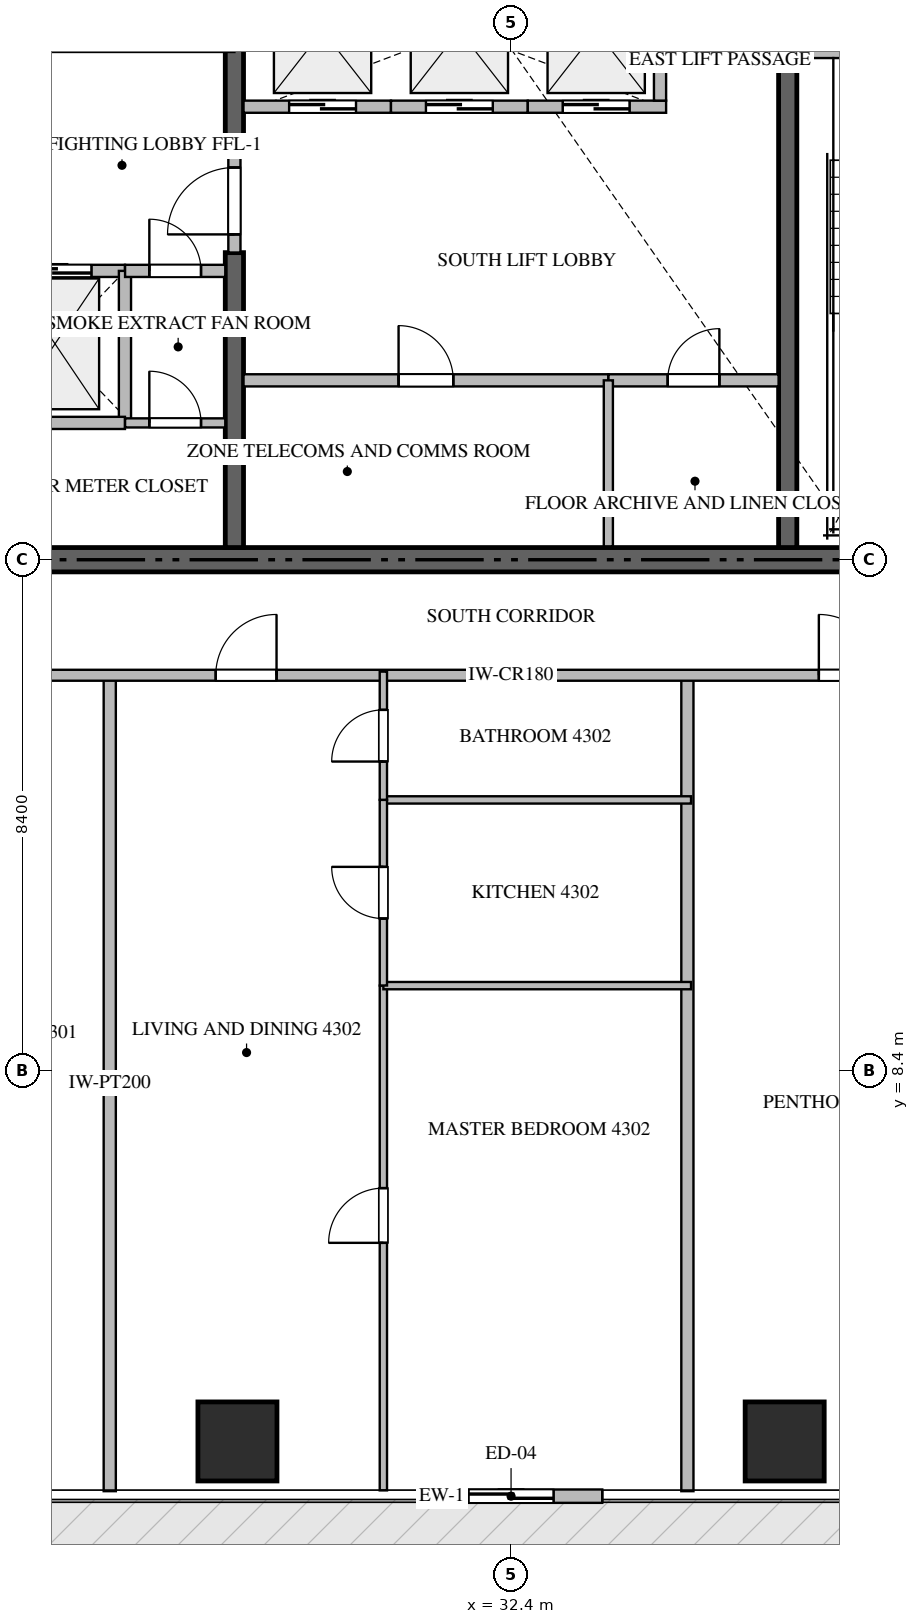
"""IFC4 building model, lengths in metres.
Left out: names, types, materials, properties, quantities, classifications, styles, units other than length and angle.
Written with IfcOpenShell. Run it as: python <this file> out.ifc"""

import sys

from ifc_helpers import new_model, si_unit, direction, frame, frame_2d, origin, origin_2d, place, context, subcontext, project, spatial, rectangle, extrude, source, transform, mapped, element, fill, save


model = new_model("IFC4")
c1 = context("Model", 3, precision=1e-05, world=origin(), true_north=direction((0.0, 1.0)))
c2 = subcontext(c1, "Body", "Model", "MODEL_VIEW")
j1 = project(units=[si_unit("LENGTHUNIT", "METRE"), si_unit("PLANEANGLEUNIT", "RADIAN")], contexts=[c1])
p1 = place(None, origin())
s1 = spatial("IfcSite", under=j1, at=p1, CompositionType="ELEMENT")
p2 = place(p1, origin())
s2 = spatial("IfcBuilding", under=s1, at=p2, CompositionType="ELEMENT")
p3 = place(p2, frame((0.0, 0.0, 172.65)))
s3 = spatial("IfcBuildingStorey", under=s2, at=p3, CompositionType="ELEMENT", Elevation=172.65)
p4 = place(p3, frame((23.4, 16.8, -0.26), z_axis=(0.0, 0.0, 1.0), x_axis=(1.0, 0.0, 0.0)))
e1 = element("IfcWall", 1, at=p4, inside=s3, PredefinedType="SHEAR", context=c2, shape_type="SweptSolid", body=[
    extrude(rectangle(XDim=18.0, YDim=0.4, at=frame_2d((9.0, 0.0))), origin(), (0.0, 0.0, 1.0), 3.748),
])
p5 = place(p3, frame((27.85, 17.0, -0.26), z_axis=(0.0, 0.0, 1.0), x_axis=(0.0, 1.0, 0.0)))
e2 = element("IfcWall", 2, at=p5, inside=s3, PredefinedType="SHEAR", context=c2, shape_type="SweptSolid", body=[
    extrude(rectangle(XDim=4.85, YDim=0.3, at=frame_2d((2.425, 0.0))), origin(), (0.0, 0.0, 1.0), 3.748),
])
p6 = place(p3, frame((27.85, 23.55, -0.26), z_axis=(0.0, 0.0, 1.0), x_axis=(0.0, 1.0, 0.0)))
e3 = element("IfcWall", 3, at=p6, inside=s3, PredefinedType="SHEAR", context=c2, shape_type="SweptSolid", body=[
    extrude(rectangle(XDim=9.85, YDim=0.3, at=frame_2d((4.925, 0.0))), origin(), (0.0, 0.0, 1.0), 3.748),
])
p7 = place(p3, frame((36.95, 17.0, -0.26), z_axis=(0.0, 0.0, 1.0), x_axis=(0.0, 1.0, 0.0)))
e4 = element("IfcWall", 4, at=p7, inside=s3, PredefinedType="SHEAR", context=c2, shape_type="SweptSolid", body=[
    extrude(rectangle(XDim=8.35, YDim=0.3, at=frame_2d((4.175, 0.0))), origin(), (0.0, 0.0, 1.0), 3.748),
])
m1 = source(origin(), c2, "Body", "SweptSolid", [
    extrude(rectangle(XDim=1.3, YDim=1.3, at=origin_2d()), origin(), (0.0, 0.0, 1.0), 3.75),
])
for number, where, z_axis, x_axis in (
    (5, (27.9, 2.3, -0.26), (0.0, 0.0, 1.0), (1.0, 0.0, 0.0)),
    (6, (36.9, 2.3, -0.26), (0.0, 0.0, 1.0), (1.0, 0.0, 0.0)),
):
    element("IfcColumn", number, at=place(p3, frame(where, z_axis=z_axis, x_axis=x_axis)), inside=s3, PredefinedType="COLUMN", context=c2, shape_type="MappedRepresentation", body=[
        mapped(m1, transform((0.0, 0.0, 0.0), scale=1.0)),
    ])
p8 = place(p3, frame((30.9, 1.4, 0.0), z_axis=(0.0, 0.0, 1.0), x_axis=(1.0, 0.0, 0.0)))
e7 = element("IfcWall", 7, at=p8, inside=s3, PredefinedType="ELEMENTEDWALL", context=c2, shape_type="SweptSolid", body=[
    extrude(rectangle(XDim=3.0, YDim=0.22, at=frame_2d((1.5, 0.0))), origin(), (0.0, 0.0, 1.0), 3.475),
])
p9 = place(p8, frame((0.8, 0.0, 0.0)))
e8 = element("IfcOpeningElement", 8, at=p9, cuts=e7, PredefinedType="OPENING", context=c2, shape_type="SweptSolid", body=[
    extrude(rectangle(XDim=1.4, YDim=2.25, at=frame_2d((0.7, 1.125))), frame((0.0, 0.12, 0.0), z_axis=(0.0, -1.0, 0.0), x_axis=(1.0, 0.0, 0.0)), (0.0, 0.0, 1.0), 0.24),
])
p10 = place(p3, frame((36.95, 25.15, 0.0), z_axis=(0.0, 0.0, 1.0), x_axis=(1.0, 0.0, 0.0)))
e9 = element("IfcWall", 9, at=p10, inside=s3, PredefinedType="STANDARD", context=c2, shape_type="SweptSolid", body=[
    extrude(rectangle(XDim=4.45, YDim=0.2, at=frame_2d((2.225, 0.0))), origin(), (0.0, 0.0, 1.0), 3.49),
])
p11 = place(p10, frame((1.65, 0.0, 0.0)))
e10 = element("IfcOpeningElement", 10, at=p11, cuts=e9, PredefinedType="OPENING", context=c2, shape_type="SweptSolid", body=[
    extrude(rectangle(XDim=1.1, YDim=2.15, at=frame_2d((0.55, 1.075))), frame((0.0, 0.11, 0.0), z_axis=(0.0, -1.0, 0.0), x_axis=(1.0, 0.0, 0.0)), (0.0, 0.0, 1.0), 0.22),
])
p12 = place(p3, frame((23.6, 21.55, 0.0), z_axis=(0.0, 0.0, 1.0), x_axis=(1.0, 0.0, 0.0)))
e11 = element("IfcWall", 11, at=p12, inside=s3, PredefinedType="STANDARD", context=c2, shape_type="SweptSolid", body=[
    extrude(rectangle(XDim=2.45, YDim=0.2, at=frame_2d((1.225, 0.0))), origin(), (0.0, 0.0, 1.0), 3.49),
])
p13 = place(p12, frame((0.7, 0.0, 0.0)))
e12 = element("IfcOpeningElement", 12, at=p13, cuts=e11, PredefinedType="OPENING", context=c2, shape_type="SweptSolid", body=[
    extrude(rectangle(XDim=1.2, YDim=2.2, at=frame_2d((0.6, 1.1))), frame((0.0, 0.11, 0.0), z_axis=(0.0, -1.0, 0.0), x_axis=(1.0, 0.0, 0.0)), (0.0, 0.0, 1.0), 0.22),
])
p14 = place(p3, frame((28.0, 24.25, 0.0), z_axis=(0.0, 0.0, 1.0), x_axis=(1.0, 0.0, 0.0)))
e13 = element("IfcWall", 13, at=p14, inside=s3, PredefinedType="STANDARD", context=c2, shape_type="SweptSolid", body=[
    extrude(rectangle(XDim=2.425, YDim=0.2, at=frame_2d((1.212, 0.0))), origin(), (0.0, 0.0, 1.0), 3.49),
])
p15 = place(p14, frame((0.75, 0.0, 0.0)))
e14 = element("IfcOpeningElement", 14, at=p15, cuts=e13, PredefinedType="OPENING", context=c2, shape_type="SweptSolid", body=[
    extrude(rectangle(XDim=1.1, YDim=2.2, at=frame_2d((0.55, 1.1))), frame((0.0, 0.11, 0.0), z_axis=(0.0, -1.0, 0.0), x_axis=(1.0, 0.0, 0.0)), (0.0, 0.0, 1.0), 0.22),
])
p16 = place(p3, frame((30.425, 24.25, 0.0), z_axis=(0.0, 0.0, 1.0), x_axis=(1.0, 0.0, 0.0)))
e15 = element("IfcWall", 15, at=p16, inside=s3, PredefinedType="STANDARD", context=c2, shape_type="SweptSolid", body=[
    extrude(rectangle(XDim=2.25, YDim=0.2, at=frame_2d((1.125, 0.0))), origin(), (0.0, 0.0, 1.0), 3.49),
])
p17 = place(p16, frame((0.575, 0.0, 0.0)))
e16 = element("IfcOpeningElement", 16, at=p17, cuts=e15, PredefinedType="OPENING", context=c2, shape_type="SweptSolid", body=[
    extrude(rectangle(XDim=1.1, YDim=2.2, at=frame_2d((0.55, 1.1))), frame((0.0, 0.11, 0.0), z_axis=(0.0, -1.0, 0.0), x_axis=(1.0, 0.0, 0.0)), (0.0, 0.0, 1.0), 0.22),
])
p18 = place(p3, frame((32.675, 24.25, 0.0), z_axis=(0.0, 0.0, 1.0), x_axis=(1.0, 0.0, 0.0)))
e17 = element("IfcWall", 17, at=p18, inside=s3, PredefinedType="STANDARD", context=c2, shape_type="SweptSolid", body=[
    extrude(rectangle(XDim=2.275, YDim=0.2, at=frame_2d((1.137, 0.0))), origin(), (0.0, 0.0, 1.0), 3.49),
])
p19 = place(p18, frame((0.575, 0.0, 0.0)))
e18 = element("IfcOpeningElement", 18, at=p19, cuts=e17, PredefinedType="OPENING", context=c2, shape_type="SweptSolid", body=[
    extrude(rectangle(XDim=1.1, YDim=2.2, at=frame_2d((0.55, 1.1))), frame((0.0, 0.11, 0.0), z_axis=(0.0, -1.0, 0.0), x_axis=(1.0, 0.0, 0.0)), (0.0, 0.0, 1.0), 0.22),
])
for number, where, z_axis, x_axis in (
    (19, (34.85, 24.35, 0.0), (0.0, 0.0, 1.0), (0.0, 1.0, 0.0)),
    (20, (26.05, 19.05, 0.0), (0.0, 0.0, 1.0), (0.0, 1.0, 0.0)),
):
    element("IfcWall", number, at=place(p3, frame(where, z_axis=z_axis, x_axis=x_axis)), inside=s3, PredefinedType="STANDARD", context=c2, shape_type="SweptSolid", body=[
        extrude(rectangle(XDim=2.5, YDim=0.2, at=frame_2d((1.25, 0.0))), origin(), (0.0, 0.0, 1.0), 3.49),
    ])
p20 = place(p3, frame((23.6, 19.05, 0.0), z_axis=(0.0, 0.0, 1.0), x_axis=(1.0, 0.0, 0.0)))
e21 = element("IfcWall", 21, at=p20, inside=s3, PredefinedType="STANDARD", context=c2, shape_type="SweptSolid", body=[
    extrude(rectangle(XDim=2.45, YDim=0.2, at=frame_2d((1.225, 0.0))), origin(), (0.0, 0.0, 1.0), 3.49),
])
p21 = place(p3, frame((26.052, 21.55, 0.0), z_axis=(0.0, 0.0, 1.0), x_axis=(1.0, 0.0, 0.0)))
e22 = element("IfcWall", 22, at=p21, inside=s3, PredefinedType="STANDARD", context=c2, shape_type="SweptSolid", body=[
    extrude(rectangle(XDim=1.648, YDim=0.2, at=frame_2d((0.824, 0.0))), origin(), (0.0, 0.0, 1.0), 3.49),
])
p22 = place(p21, frame((0.399, 0.0, 0.0)))
e23 = element("IfcOpeningElement", 23, at=p22, cuts=e22, PredefinedType="OPENING", context=c2, shape_type="SweptSolid", body=[
    extrude(rectangle(XDim=0.85, YDim=2.1, at=frame_2d((0.425, 1.05))), frame((0.0, 0.11, 0.0), z_axis=(0.0, -1.0, 0.0), x_axis=(1.0, 0.0, 0.0)), (0.0, 0.0, 1.0), 0.22),
])
p23 = place(p3, frame((27.85, 21.852, 0.0), z_axis=(0.0, 0.0, 1.0), x_axis=(0.0, 1.0, 0.0)))
e24 = element("IfcWall", 24, at=p23, inside=s3, PredefinedType="STANDARD", context=c2, shape_type="SweptSolid", body=[
    extrude(rectangle(XDim=1.696, YDim=0.2, at=frame_2d((0.848, 0.0))), origin(), (0.0, 0.0, 1.0), 3.49),
])
p24 = place(p23, frame((0.298, 0.0, 0.0)))
e25 = element("IfcOpeningElement", 25, at=p24, cuts=e24, PredefinedType="OPENING", context=c2, shape_type="SweptSolid", body=[
    extrude(rectangle(XDim=1.1, YDim=2.15, at=frame_2d((0.55, 1.075))), frame((0.0, 0.11, 0.0), z_axis=(0.0, -1.0, 0.0), x_axis=(1.0, 0.0, 0.0)), (0.0, 0.0, 1.0), 0.22),
])
p25 = place(p3, frame((26.052, 19.05, 0.0), z_axis=(0.0, 0.0, 1.0), x_axis=(1.0, 0.0, 0.0)))
e26 = element("IfcWall", 26, at=p25, inside=s3, PredefinedType="PARTITIONING", context=c2, shape_type="SweptSolid", body=[
    extrude(rectangle(XDim=1.648, YDim=0.15, at=frame_2d((0.824, 0.0))), origin(), (0.0, 0.0, 1.0), 3.49),
])
p26 = place(p25, frame((0.399, 0.0, 0.0)))
e27 = element("IfcOpeningElement", 27, at=p26, cuts=e26, PredefinedType="OPENING", context=c2, shape_type="SweptSolid", body=[
    extrude(rectangle(XDim=0.85, YDim=2.1, at=frame_2d((0.425, 1.05))), frame((0.0, 0.085, 0.0), z_axis=(0.0, -1.0, 0.0), x_axis=(1.0, 0.0, 0.0)), (0.0, 0.0, 1.0), 0.17),
])
p27 = place(p3, frame((28.0, 19.75, 0.0), z_axis=(0.0, 0.0, 1.0), x_axis=(1.0, 0.0, 0.0)))
e28 = element("IfcWall", 28, at=p27, inside=s3, PredefinedType="STANDARD", context=c2, shape_type="SweptSolid", body=[
    extrude(rectangle(XDim=6.0, YDim=0.2, at=frame_2d((3.0, 0.0))), origin(), (0.0, 0.0, 1.0), 3.49),
])
p28 = place(p27, frame((2.55, 0.0, 0.0)))
e29 = element("IfcOpeningElement", 29, at=p28, cuts=e28, PredefinedType="OPENING", context=c2, shape_type="SweptSolid", body=[
    extrude(rectangle(XDim=0.9, YDim=2.1, at=frame_2d((0.45, 1.05))), frame((0.0, 0.11, 0.0), z_axis=(0.0, -1.0, 0.0), x_axis=(1.0, 0.0, 0.0)), (0.0, 0.0, 1.0), 0.22),
])
p29 = place(p3, frame((34.002, 19.75, 0.0), z_axis=(0.0, 0.0, 1.0), x_axis=(1.0, 0.0, 0.0)))
e30 = element("IfcWall", 30, at=p29, inside=s3, PredefinedType="STANDARD", context=c2, shape_type="SweptSolid", body=[
    extrude(rectangle(XDim=2.798, YDim=0.2, at=frame_2d((1.399, 0.0))), origin(), (0.0, 0.0, 1.0), 3.49),
])
p30 = place(p29, frame((0.974, 0.0, 0.0)))
e31 = element("IfcOpeningElement", 31, at=p30, cuts=e30, PredefinedType="OPENING", context=c2, shape_type="SweptSolid", body=[
    extrude(rectangle(XDim=0.85, YDim=2.1, at=frame_2d((0.425, 1.05))), frame((0.0, 0.11, 0.0), z_axis=(0.0, -1.0, 0.0), x_axis=(1.0, 0.0, 0.0)), (0.0, 0.0, 1.0), 0.22),
])
p31 = place(p3, frame((34.0, 17.02, 0.0), z_axis=(0.0, 0.0, 1.0), x_axis=(0.0, 1.0, 0.0)))
e32 = element("IfcWall", 32, at=p31, inside=s3, PredefinedType="PARTITIONING", context=c2, shape_type="SweptSolid", body=[
    extrude(rectangle(XDim=2.73, YDim=0.15, at=frame_2d((1.365, 0.0))), origin(), (0.0, 0.0, 1.0), 3.49),
])
for number, where, z_axis, x_axis in (
    (33, (25.8, 1.482, 0.0), (0.0, 0.0, 1.0), (0.0, 1.0, 0.0)),
    (34, (35.3, 1.482, 0.0), (0.0, 0.0, 1.0), (0.0, 1.0, 0.0)),
):
    element("IfcWall", number, at=place(p3, frame(where, z_axis=z_axis, x_axis=x_axis)), inside=s3, PredefinedType="PARTITIONING", context=c2, shape_type="SweptSolid", body=[
        extrude(rectangle(XDim=13.418, YDim=0.2, at=frame_2d((6.709, 0.0))), origin(), (0.0, 0.0, 1.0), 3.49),
    ])
p32 = place(p3, frame((20.952, 14.9, 0.0), z_axis=(0.0, 0.0, 1.0), x_axis=(1.0, 0.0, 0.0)))
e35 = element("IfcWall", 35, at=p32, inside=s3, PredefinedType="PARTITIONING", context=c2, shape_type="SweptSolid", body=[
    extrude(rectangle(XDim=22.896, YDim=0.18, at=frame_2d((11.448, 0.0))), origin(), (0.0, 0.0, 1.0), 3.49),
])
p33 = place(p32, frame((2.387, 0.0, 0.0)))
e36 = element("IfcOpeningElement", 36, at=p33, cuts=e35, PredefinedType="OPENING", context=c2, shape_type="SweptSolid", body=[
    extrude(rectangle(XDim=1.0, YDim=2.15, at=frame_2d((0.5, 1.075))), frame((0.0, 0.1, 0.0), z_axis=(0.0, -1.0, 0.0), x_axis=(1.0, 0.0, 0.0)), (0.0, 0.0, 1.0), 0.2),
])
p34 = place(p32, frame((6.591, 0.0, 0.0)))
e37 = element("IfcOpeningElement", 37, at=p34, cuts=e35, PredefinedType="OPENING", context=c2, shape_type="SweptSolid", body=[
    extrude(rectangle(XDim=1.0, YDim=2.15, at=frame_2d((0.5, 1.075))), frame((0.0, 0.1, 0.0), z_axis=(0.0, -1.0, 0.0), x_axis=(1.0, 0.0, 0.0)), (0.0, 0.0, 1.0), 0.2),
])
p35 = place(p32, frame((16.51, 0.0, 0.0)))
e38 = element("IfcOpeningElement", 38, at=p35, cuts=e35, PredefinedType="OPENING", context=c2, shape_type="SweptSolid", body=[
    extrude(rectangle(XDim=1.0, YDim=2.15, at=frame_2d((0.5, 1.075))), frame((0.0, 0.1, 0.0), z_axis=(0.0, -1.0, 0.0), x_axis=(1.0, 0.0, 0.0)), (0.0, 0.0, 1.0), 0.2),
])
p36 = place(p3, frame((30.3, 1.495, 0.0), z_axis=(0.0, 0.0, 1.0), x_axis=(0.0, 1.0, 0.0)))
e39 = element("IfcWall", 39, at=p36, inside=s3, PredefinedType="PARTITIONING", context=c2, shape_type="SweptSolid", body=[
    extrude(rectangle(XDim=8.301, YDim=0.12, at=frame_2d((4.15, 0.0))), origin(), (0.0, 0.0, 1.0), 3.49),
])
p37 = place(p36, frame((4.071, 0.0, 0.0)))
e40 = element("IfcOpeningElement", 40, at=p37, cuts=e39, PredefinedType="OPENING", context=c2, shape_type="SweptSolid", body=[
    extrude(rectangle(XDim=0.9, YDim=2.1, at=frame_2d((0.45, 1.05))), frame((0.0, 0.07, 0.0), z_axis=(0.0, -1.0, 0.0), x_axis=(1.0, 0.0, 0.0)), (0.0, 0.0, 1.0), 0.14),
])
for number, where, z_axis, x_axis in (
    (41, (30.3, 9.796, 0.0), (0.0, 0.0, 1.0), (1.0, 0.0, 0.0)),
    (42, (30.3, 12.85, 0.0), (0.0, 0.0, 1.0), (1.0, 0.0, 0.0)),
):
    element("IfcWall", number, at=place(p3, frame(where, z_axis=z_axis, x_axis=x_axis)), inside=s3, PredefinedType="PARTITIONING", context=c2, shape_type="SweptSolid", body=[
        extrude(rectangle(XDim=5.06, YDim=0.12, at=frame_2d((2.53, 0.0))), origin(), (0.0, 0.0, 1.0), 3.49),
    ])
p38 = place(p3, frame((30.3, 9.798, 0.0), z_axis=(0.0, 0.0, 1.0), x_axis=(0.0, 1.0, 0.0)))
e43 = element("IfcWall", 43, at=p38, inside=s3, PredefinedType="PARTITIONING", context=c2, shape_type="SweptSolid", body=[
    extrude(rectangle(XDim=3.052, YDim=0.12, at=frame_2d((1.526, 0.0))), origin(), (0.0, 0.0, 1.0), 3.49),
])
p39 = place(p38, frame((1.101, 0.0, 0.0)))
e44 = element("IfcOpeningElement", 44, at=p39, cuts=e43, PredefinedType="OPENING", context=c2, shape_type="SweptSolid", body=[
    extrude(rectangle(XDim=0.85, YDim=2.1, at=frame_2d((0.425, 1.05))), frame((0.0, 0.07, 0.0), z_axis=(0.0, -1.0, 0.0), x_axis=(1.0, 0.0, 0.0)), (0.0, 0.0, 1.0), 0.14),
])
p40 = place(p3, frame((30.3, 12.852, 0.0), z_axis=(0.0, 0.0, 1.0), x_axis=(0.0, 1.0, 0.0)))
e45 = element("IfcWall", 45, at=p40, inside=s3, PredefinedType="PARTITIONING", context=c2, shape_type="SweptSolid", body=[
    extrude(rectangle(XDim=2.108, YDim=0.12, at=frame_2d((1.054, 0.0))), origin(), (0.0, 0.0, 1.0), 3.49),
])
p41 = place(p40, frame((0.629, 0.0, 0.0)))
e46 = element("IfcOpeningElement", 46, at=p41, cuts=e45, PredefinedType="OPENING", context=c2, shape_type="SweptSolid", body=[
    extrude(rectangle(XDim=0.85, YDim=2.1, at=frame_2d((0.425, 1.05))), frame((0.0, 0.07, 0.0), z_axis=(0.0, -1.0, 0.0), x_axis=(1.0, 0.0, 0.0)), (0.0, 0.0, 1.0), 0.14),
])
m2 = source(origin(), c2, "Body", "SweptSolid", [
    extrude(rectangle(XDim=1.4, YDim=2.25, at=frame_2d((0.7, 1.125))), frame((0.0, 0.025, 0.0), z_axis=(0.0, -1.0, 0.0), x_axis=(1.0, 0.0, 0.0)), (0.0, 0.0, 1.0), 0.05),
])
p42 = place(p9, origin())
e47 = element("IfcDoor", 47, at=p42, inside=s3, OperationType="SLIDING_TO_LEFT", PredefinedType="DOOR", context=c2, shape_type="MappedRepresentation", body=[
    mapped(m2, transform((0.0, 0.0, 0.0), scale=1.0)),
])
fill(e8, e47)
m3 = source(origin(), c2, "Body", "SweptSolid", [
    extrude(rectangle(XDim=1.2, YDim=2.2, at=frame_2d((0.6, 1.1))), frame((0.0, 0.025, 0.0), z_axis=(0.0, -1.0, 0.0), x_axis=(1.0, 0.0, 0.0)), (0.0, 0.0, 1.0), 0.05),
])
p43 = place(p13, origin())
e48 = element("IfcDoor", 48, at=p43, inside=s3, OperationType="DOUBLE_DOOR_SLIDING", PredefinedType="DOOR", context=c2, shape_type="MappedRepresentation", body=[
    mapped(m3, transform((0.0, 0.0, 0.0), scale=1.0)),
])
fill(e12, e48)
m4 = source(origin(), c2, "Body", "SweptSolid", [
    extrude(rectangle(XDim=1.1, YDim=2.2, at=frame_2d((0.55, 1.1))), frame((0.0, 0.025, 0.0), z_axis=(0.0, -1.0, 0.0), x_axis=(1.0, 0.0, 0.0)), (0.0, 0.0, 1.0), 0.05),
])
p44 = place(p15, origin())
e49 = element("IfcDoor", 49, at=p44, inside=s3, OperationType="DOUBLE_DOOR_SLIDING", PredefinedType="DOOR", context=c2, shape_type="MappedRepresentation", body=[
    mapped(m4, transform((0.0, 0.0, 0.0), scale=1.0)),
])
fill(e14, e49)
p45 = place(p17, origin())
e50 = element("IfcDoor", 50, at=p45, inside=s3, OperationType="DOUBLE_DOOR_SLIDING", PredefinedType="DOOR", context=c2, shape_type="MappedRepresentation", body=[
    mapped(m4, transform((0.0, 0.0, 0.0), scale=1.0)),
])
fill(e16, e50)
p46 = place(p19, origin())
e51 = element("IfcDoor", 51, at=p46, inside=s3, OperationType="DOUBLE_DOOR_SLIDING", PredefinedType="DOOR", context=c2, shape_type="MappedRepresentation", body=[
    mapped(m4, transform((0.0, 0.0, 0.0), scale=1.0)),
])
fill(e18, e51)
m5 = source(origin(), c2, "Body", "SweptSolid", [
    extrude(rectangle(XDim=0.85, YDim=2.1, at=frame_2d((0.425, 1.05))), frame((0.0, 0.025, 0.0), z_axis=(0.0, -1.0, 0.0), x_axis=(1.0, 0.0, 0.0)), (0.0, 0.0, 1.0), 0.05),
])
p47 = place(p22, origin())
e52 = element("IfcDoor", 52, at=p47, inside=s3, OperationType="SINGLE_SWING_LEFT", PredefinedType="DOOR", context=c2, shape_type="MappedRepresentation", body=[
    mapped(m5, transform((0.0, 0.0, 0.0), scale=1.0)),
])
fill(e23, e52)
m6 = source(origin(), c2, "Body", "SweptSolid", [
    extrude(rectangle(XDim=1.1, YDim=2.15, at=frame_2d((0.55, 1.075))), frame((0.0, 0.025, 0.0), z_axis=(0.0, -1.0, 0.0), x_axis=(1.0, 0.0, 0.0)), (0.0, 0.0, 1.0), 0.05),
])
p48 = place(p24, origin())
e53 = element("IfcDoor", 53, at=p48, inside=s3, OperationType="SINGLE_SWING_LEFT", PredefinedType="DOOR", context=c2, shape_type="MappedRepresentation", body=[
    mapped(m6, transform((0.0, 0.0, 0.0), scale=1.0)),
])
fill(e25, e53)
p49 = place(p26, origin())
e54 = element("IfcDoor", 54, at=p49, inside=s3, OperationType="SINGLE_SWING_LEFT", PredefinedType="DOOR", context=c2, shape_type="MappedRepresentation", body=[
    mapped(m5, transform((0.0, 0.0, 0.0), scale=1.0)),
])
fill(e27, e54)
m7 = source(origin(), c2, "Body", "SweptSolid", [
    extrude(rectangle(XDim=0.9, YDim=2.1, at=frame_2d((0.45, 1.05))), frame((0.0, 0.025, 0.0), z_axis=(0.0, -1.0, 0.0), x_axis=(1.0, 0.0, 0.0)), (0.0, 0.0, 1.0), 0.05),
])
p50 = place(p28, origin())
e55 = element("IfcDoor", 55, at=p50, inside=s3, OperationType="SINGLE_SWING_LEFT", PredefinedType="DOOR", context=c2, shape_type="MappedRepresentation", body=[
    mapped(m7, transform((0.0, 0.0, 0.0), scale=1.0)),
])
fill(e29, e55)
p51 = place(p30, origin())
e56 = element("IfcDoor", 56, at=p51, inside=s3, OperationType="SINGLE_SWING_RIGHT", PredefinedType="DOOR", context=c2, shape_type="MappedRepresentation", body=[
    mapped(m5, transform((0.0, 0.0, 0.0), scale=1.0)),
])
fill(e31, e56)
m8 = source(origin(), c2, "Body", "SweptSolid", [
    extrude(rectangle(XDim=1.0, YDim=2.15, at=frame_2d((0.5, 1.075))), frame((0.0, 0.025, 0.0), z_axis=(0.0, -1.0, 0.0), x_axis=(1.0, 0.0, 0.0)), (0.0, 0.0, 1.0), 0.05),
])
p52 = place(p34, origin())
e57 = element("IfcDoor", 57, at=p52, inside=s3, OperationType="SINGLE_SWING_RIGHT", PredefinedType="DOOR", context=c2, shape_type="MappedRepresentation", body=[
    mapped(m8, transform((0.0, 0.0, 0.0), scale=1.0)),
])
fill(e37, e57)
p53 = place(p35, origin())
e58 = element("IfcDoor", 58, at=p53, inside=s3, OperationType="SINGLE_SWING_LEFT", PredefinedType="DOOR", context=c2, shape_type="MappedRepresentation", body=[
    mapped(m8, transform((0.0, 0.0, 0.0), scale=1.0)),
])
fill(e38, e58)
p54 = place(p37, origin())
e59 = element("IfcDoor", 59, at=p54, inside=s3, OperationType="SINGLE_SWING_LEFT", PredefinedType="DOOR", context=c2, shape_type="MappedRepresentation", body=[
    mapped(m7, transform((0.0, 0.0, 0.0), scale=1.0)),
])
fill(e40, e59)
p55 = place(p39, origin())
e60 = element("IfcDoor", 60, at=p55, inside=s3, OperationType="SINGLE_SWING_RIGHT", PredefinedType="DOOR", context=c2, shape_type="MappedRepresentation", body=[
    mapped(m5, transform((0.0, 0.0, 0.0), scale=1.0)),
])
fill(e44, e60)
p56 = place(p41, origin())
e61 = element("IfcDoor", 61, at=p56, inside=s3, OperationType="SINGLE_SWING_LEFT", PredefinedType="DOOR", context=c2, shape_type="MappedRepresentation", body=[
    mapped(m5, transform((0.0, 0.0, 0.0), scale=1.0)),
])
fill(e46, e61)
save(model, sys.argv[1])
